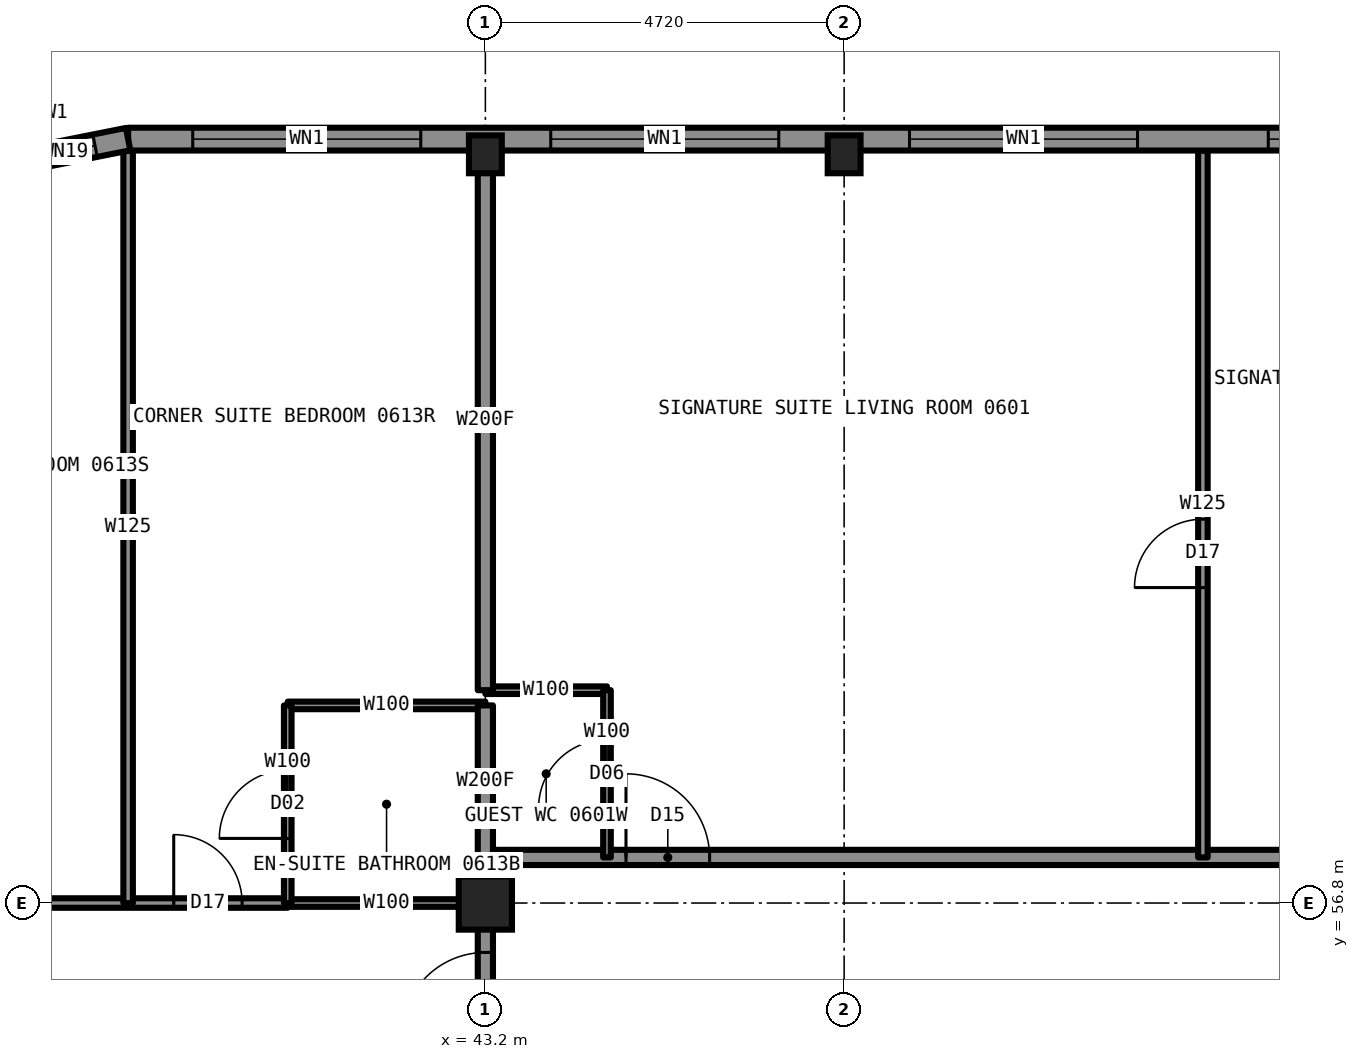
"""IFC4 building model, lengths in metres.
Left out: names, types, materials, properties, quantities, classifications, styles, units other than length and angle.
Written with IfcOpenShell. Run it as: python <this file> out.ifc"""

import sys

from ifc_helpers import new_model, si_unit, direction, frame, frame_2d, origin, origin_2d, place, context, subcontext, project, spatial, rectangle, hollow_rectangle, i_section, extrude, element, fill, save


model = new_model("IFC4")
c1 = context("Model", 3, precision=1e-05, world=origin(), true_north=direction((0.0, 1.0)))
c2 = subcontext(c1, "Body", "Model", "MODEL_VIEW")
j1 = project(units=[si_unit("LENGTHUNIT", "METRE"), si_unit("PLANEANGLEUNIT", "RADIAN")], contexts=[c1])
p1 = place(None, origin())
s1 = spatial("IfcSite", under=j1, at=p1, CompositionType="ELEMENT")
p2 = place(p1, origin())
s2 = spatial("IfcBuilding", under=s1, at=p2, CompositionType="ELEMENT")
p3 = place(p2, frame((0.0, 0.0, 28.5)))
s3 = spatial("IfcBuildingStorey", under=s2, at=p3, CompositionType="ELEMENT", Elevation=28.5)
for number, where, z_axis, x_axis in (
    (1, (43.2, 66.65, 0.0), (0.0, 0.0, 1.0), (1.0, 0.0, 0.0)),
    (2, (47.92, 66.65, 0.0), (0.0, 0.0, 1.0), (1.0, 0.0, 0.0)),
):
    element("IfcColumn", number, at=place(p3, frame(where, z_axis=z_axis, x_axis=x_axis)), inside=s3, PredefinedType="COLUMN", context=c2, shape_type="SweptSolid", body=[
        extrude(i_section(OverallWidth=0.432, OverallDepth=0.498, WebThickness=0.056, FlangeThickness=0.089, at=origin_2d()), origin(), (0.0, 0.0, 1.0), 3.5),
    ])
p4 = place(p3, frame((43.2, 56.8, 0.0), z_axis=(0.0, 0.0, 1.0), x_axis=(1.0, 0.0, 0.0)))
e3 = element("IfcColumn", 3, at=p4, inside=s3, PredefinedType="COLUMN", context=c2, shape_type="SweptSolid", body=[
    extrude(hollow_rectangle(XDim=0.7, YDim=0.7, WallThickness=0.06, at=origin_2d()), origin(), (0.0, 0.0, 1.0), 3.5),
])
p5 = place(p3, frame((40.6, 56.8, 0.0), z_axis=(0.0, 0.0, 1.0), x_axis=(1.0, 0.0, 0.0)))
e4 = element("IfcWall", 4, at=p5, inside=s3, PredefinedType="PARTITIONING", context=c2, shape_type="SweptSolid", body=[
    extrude(rectangle(XDim=2.6, YDim=0.1, at=frame_2d((1.3, 0.0))), origin(), (0.0, 0.0, 1.0), 2.573),
])
p6 = place(p3, frame((33.3, 56.8, 0.0), z_axis=(0.0, 0.0, 1.0), x_axis=(1.0, 0.0, 0.0)))
e5 = element("IfcWall", 5, at=p6, inside=s3, PredefinedType="PARTITIONING", context=c2, shape_type="SweptSolid", body=[
    extrude(rectangle(XDim=7.3, YDim=0.125, at=frame_2d((3.65, 0.0))), origin(), (0.0, 0.0, 1.0), 2.573),
])
p7 = place(p6, frame((5.8, 0.0, 0.0)))
e6 = element("IfcOpeningElement", 6, at=p7, cuts=e5, PredefinedType="OPENING", context=c2, shape_type="SweptSolid", body=[
    extrude(rectangle(XDim=0.9, YDim=2.2, at=frame_2d((0.45, 1.1))), frame((0.0, 0.073, 0.0), z_axis=(0.0, -1.0, 0.0), x_axis=(1.0, 0.0, 0.0)), (0.0, 0.0, 1.0), 0.145),
])
p8 = place(p6, frame((2.0, 0.0, 0.0)))
e7 = element("IfcOpeningElement", 7, at=p8, cuts=e5, PredefinedType="OPENING", context=c2, shape_type="SweptSolid", body=[
    extrude(rectangle(XDim=0.9, YDim=2.2, at=frame_2d((0.45, 1.1))), frame((0.0, 0.073, 0.0), z_axis=(0.0, -1.0, 0.0), x_axis=(1.0, 0.0, 0.0)), (0.0, 0.0, 1.0), 0.145),
])
p9 = place(p3, frame((43.2, 57.4, 0.0), z_axis=(0.0, 0.0, 1.0), x_axis=(1.0, 0.0, 0.0)))
e8 = element("IfcWall", 8, at=p9, inside=s3, PredefinedType="PARTITIONING", context=c2, shape_type="SweptSolid", body=[
    extrude(rectangle(XDim=23.6, YDim=0.2, at=frame_2d((11.8, 0.0))), origin(), (0.0, 0.0, 1.0), 3.33),
])
p10 = place(p9, frame((1.85, 0.0, 0.0)))
e9 = element("IfcOpeningElement", 9, at=p10, cuts=e8, PredefinedType="OPENING", context=c2, shape_type="SweptSolid", body=[
    extrude(rectangle(XDim=1.1, YDim=2.2, at=frame_2d((0.55, 1.1))), frame((0.0, 0.11, 0.0), z_axis=(0.0, -1.0, 0.0), x_axis=(1.0, 0.0, 0.0)), (0.0, 0.0, 1.0), 0.22),
])
p11 = place(p9, frame((15.62, 0.0, 0.0)))
e10 = element("IfcOpeningElement", 10, at=p11, cuts=e8, PredefinedType="OPENING", context=c2, shape_type="SweptSolid", body=[
    extrude(rectangle(XDim=1.0, YDim=2.2, at=frame_2d((0.5, 1.1))), frame((0.0, 0.11, 0.0), z_axis=(0.0, -1.0, 0.0), x_axis=(1.0, 0.0, 0.0)), (0.0, 0.0, 1.0), 0.22),
])
p12 = place(p9, frame((20.34, 0.0, 0.0)))
e11 = element("IfcOpeningElement", 11, at=p12, cuts=e8, PredefinedType="OPENING", context=c2, shape_type="SweptSolid", body=[
    extrude(rectangle(XDim=1.0, YDim=2.2, at=frame_2d((0.5, 1.1))), frame((0.0, 0.11, 0.0), z_axis=(0.0, -1.0, 0.0), x_axis=(1.0, 0.0, 0.0)), (0.0, 0.0, 1.0), 0.22),
])
p13 = place(p3, frame((40.6, 59.4, 0.0), z_axis=(0.0, 0.0, 1.0), x_axis=(1.0, 0.0, 0.0)))
e12 = element("IfcWall", 12, at=p13, inside=s3, PredefinedType="PARTITIONING", context=c2, shape_type="SweptSolid", body=[
    extrude(rectangle(XDim=2.6, YDim=0.1, at=frame_2d((1.3, 0.0))), origin(), (0.0, 0.0, 1.0), 3.33),
])
p14 = place(p3, frame((43.2, 59.6, 0.0), z_axis=(0.0, 0.0, 1.0), x_axis=(1.0, 0.0, 0.0)))
e13 = element("IfcWall", 13, at=p14, inside=s3, PredefinedType="PARTITIONING", context=c2, shape_type="SweptSolid", body=[
    extrude(rectangle(XDim=1.6, YDim=0.1, at=frame_2d((0.8, 0.0))), origin(), (0.0, 0.0, 1.0), 3.33),
])
p15 = place(p3, frame((44.8, 57.4, 0.0), z_axis=(0.0, 0.0, 1.0), x_axis=(0.0, 1.0, 0.0)))
e14 = element("IfcWall", 14, at=p15, inside=s3, PredefinedType="PARTITIONING", context=c2, shape_type="SweptSolid", body=[
    extrude(rectangle(XDim=2.2, YDim=0.1, at=frame_2d((1.1, 0.0))), origin(), (0.0, 0.0, 1.0), 3.33),
])
p16 = place(p15, frame((0.65, 0.0, 0.0)))
e15 = element("IfcOpeningElement", 15, at=p16, cuts=e14, PredefinedType="OPENING", context=c2, shape_type="SweptSolid", body=[
    extrude(rectangle(XDim=0.9, YDim=2.1, at=frame_2d((0.45, 1.05))), frame((0.0, 0.06, 0.0), z_axis=(0.0, -1.0, 0.0), x_axis=(1.0, 0.0, 0.0)), (0.0, 0.0, 1.0), 0.12),
])
p17 = place(p3, frame((43.2, 33.22, 0.0), z_axis=(0.0, 0.0, 1.0), x_axis=(0.0, 1.0, 0.0)))
e16 = element("IfcWall", 16, at=p17, inside=s3, PredefinedType="PARTITIONING", context=c2, shape_type="SweptSolid", body=[
    extrude(rectangle(XDim=23.56, YDim=0.2, at=frame_2d((11.78, 0.0))), origin(), (0.0, 0.0, 1.0), 3.33),
])
p18 = place(p17, frame((6.16, 0.0, 0.0)))
e17 = element("IfcOpeningElement", 17, at=p18, cuts=e16, PredefinedType="OPENING", context=c2, shape_type="SweptSolid", body=[
    extrude(rectangle(XDim=1.0, YDim=2.2, at=frame_2d((0.5, 1.1))), frame((0.0, 0.11, 0.0), z_axis=(0.0, -1.0, 0.0), x_axis=(1.0, 0.0, 0.0)), (0.0, 0.0, 1.0), 0.22),
])
p19 = place(p17, frame((11.68, 0.0, 0.0)))
e18 = element("IfcOpeningElement", 18, at=p19, cuts=e16, PredefinedType="OPENING", context=c2, shape_type="SweptSolid", body=[
    extrude(rectangle(XDim=1.0, YDim=2.2, at=frame_2d((0.5, 1.1))), frame((0.0, 0.11, 0.0), z_axis=(0.0, -1.0, 0.0), x_axis=(1.0, 0.0, 0.0)), (0.0, 0.0, 1.0), 0.22),
])
p20 = place(p17, frame((14.54, 0.0, 0.0)))
e19 = element("IfcOpeningElement", 19, at=p20, cuts=e16, PredefinedType="OPENING", context=c2, shape_type="SweptSolid", body=[
    extrude(rectangle(XDim=1.0, YDim=2.2, at=frame_2d((0.5, 1.1))), frame((0.0, 0.11, 0.0), z_axis=(0.0, -1.0, 0.0), x_axis=(1.0, 0.0, 0.0)), (0.0, 0.0, 1.0), 0.22),
])
p21 = place(p17, frame((21.83, 0.0, 0.0)))
e20 = element("IfcOpeningElement", 20, at=p21, cuts=e16, PredefinedType="OPENING", context=c2, shape_type="SweptSolid", body=[
    extrude(rectangle(XDim=1.1, YDim=2.2, at=frame_2d((0.55, 1.1))), frame((0.0, 0.11, 0.0), z_axis=(0.0, -1.0, 0.0), x_axis=(1.0, 0.0, 0.0)), (0.0, 0.0, 1.0), 0.22),
])
p22 = place(p17, frame((0.63, 0.0, 0.0)))
e21 = element("IfcOpeningElement", 21, at=p22, cuts=e16, PredefinedType="OPENING", context=c2, shape_type="SweptSolid", body=[
    extrude(rectangle(XDim=1.1, YDim=2.2, at=frame_2d((0.55, 1.1))), frame((0.0, 0.11, 0.0), z_axis=(0.0, -1.0, 0.0), x_axis=(1.0, 0.0, 0.0)), (0.0, 0.0, 1.0), 0.22),
])
p23 = place(p3, frame((43.2, 57.4, 0.0), z_axis=(0.0, 0.0, 1.0), x_axis=(0.0, 1.0, 0.0)))
e22 = element("IfcWall", 22, at=p23, inside=s3, PredefinedType="PARTITIONING", context=c2, shape_type="SweptSolid", body=[
    extrude(rectangle(XDim=2.0, YDim=0.2, at=frame_2d((1.0, 0.0))), origin(), (0.0, 0.0, 1.0), 2.573),
])
p24 = place(p3, frame((43.2, 59.6, 0.0), z_axis=(0.0, 0.0, 1.0), x_axis=(0.0, 1.0, 0.0)))
e23 = element("IfcWall", 23, at=p24, inside=s3, PredefinedType="PARTITIONING", context=c2, shape_type="SweptSolid", body=[
    extrude(rectangle(XDim=7.1, YDim=0.2, at=frame_2d((3.55, 0.0))), origin(), (0.0, 0.0, 1.0), 2.573),
])
p25 = place(p3, frame((40.6, 56.8, 0.0), z_axis=(0.0, 0.0, 1.0), x_axis=(0.0, 1.0, 0.0)))
e24 = element("IfcWall", 24, at=p25, inside=s3, PredefinedType="PARTITIONING", context=c2, shape_type="SweptSolid", body=[
    extrude(rectangle(XDim=2.6, YDim=0.1, at=frame_2d((1.3, 0.0))), origin(), (0.0, 0.0, 1.0), 3.33),
])
p26 = place(p25, frame((0.85, 0.0, 0.0)))
e25 = element("IfcOpeningElement", 25, at=p26, cuts=e24, PredefinedType="OPENING", context=c2, shape_type="SweptSolid", body=[
    extrude(rectangle(XDim=0.9, YDim=2.1, at=frame_2d((0.45, 1.05))), frame((0.0, 0.06, 0.0), z_axis=(0.0, -1.0, 0.0), x_axis=(1.0, 0.0, 0.0)), (0.0, 0.0, 1.0), 0.12),
])
p27 = place(p3, frame((38.5, 56.8, 0.0), z_axis=(0.0, 0.0, 1.0), x_axis=(0.0, 1.0, 0.0)))
e26 = element("IfcWall", 26, at=p27, inside=s3, PredefinedType="PARTITIONING", context=c2, shape_type="SweptSolid", body=[
    extrude(rectangle(XDim=9.894, YDim=0.125, at=frame_2d((4.947, 0.0))), origin(), (0.0, 0.0, 1.0), 3.33),
])
p28 = place(p3, frame((52.64, 57.4, 0.0), z_axis=(0.0, 0.0, 1.0), x_axis=(0.0, 1.0, 0.0)))
e27 = element("IfcWall", 27, at=p28, inside=s3, PredefinedType="PARTITIONING", context=c2, shape_type="SweptSolid", body=[
    extrude(rectangle(XDim=9.3, YDim=0.125, at=frame_2d((4.65, 0.0))), origin(), (0.0, 0.0, 1.0), 3.33),
])
p29 = place(p28, frame((3.55, 0.0, 0.0)))
e28 = element("IfcOpeningElement", 28, at=p29, cuts=e27, PredefinedType="OPENING", context=c2, shape_type="SweptSolid", body=[
    extrude(rectangle(XDim=0.9, YDim=2.2, at=frame_2d((0.45, 1.1))), frame((0.0, 0.073, 0.0), z_axis=(0.0, -1.0, 0.0), x_axis=(1.0, 0.0, 0.0)), (0.0, 0.0, 1.0), 0.145),
])
p30 = place(p3, frame((71.5, 66.85, 0.0), z_axis=(0.0, 0.0, 1.0), x_axis=(-1.0, 0.0, 0.0)))
e29 = element("IfcWall", 29, at=p30, inside=s3, PredefinedType="SOLIDWALL", context=c2, shape_type="SweptSolid", body=[
    extrude(rectangle(XDim=33.0, YDim=0.3, at=frame_2d((16.5, 0.0))), origin(), (0.0, 0.0, 1.0), 2.83),
])
p31 = place(p30, frame((0.85, 0.0, 0.5)))
e30 = element("IfcOpeningElement", 30, at=p31, cuts=e29, PredefinedType="OPENING", context=c2, shape_type="SweptSolid", body=[
    extrude(rectangle(XDim=3.0, YDim=2.0, at=frame_2d((1.5, 1.0))), frame((0.0, 0.16, 0.0), z_axis=(0.0, -1.0, 0.0), x_axis=(1.0, 0.0, 0.0)), (0.0, 0.0, 1.0), 0.32),
])
p32 = place(p30, frame((5.56, 0.0, 0.5)))
e31 = element("IfcOpeningElement", 31, at=p32, cuts=e29, PredefinedType="OPENING", context=c2, shape_type="SweptSolid", body=[
    extrude(rectangle(XDim=3.0, YDim=2.0, at=frame_2d((1.5, 1.0))), frame((0.0, 0.16, 0.0), z_axis=(0.0, -1.0, 0.0), x_axis=(1.0, 0.0, 0.0)), (0.0, 0.0, 1.0), 0.32),
])
p33 = place(p30, frame((10.28, 0.0, 0.5)))
e32 = element("IfcOpeningElement", 32, at=p33, cuts=e29, PredefinedType="OPENING", context=c2, shape_type="SweptSolid", body=[
    extrude(rectangle(XDim=3.0, YDim=2.0, at=frame_2d((1.5, 1.0))), frame((0.0, 0.16, 0.0), z_axis=(0.0, -1.0, 0.0), x_axis=(1.0, 0.0, 0.0)), (0.0, 0.0, 1.0), 0.32),
])
p34 = place(p30, frame((15.0, 0.0, 0.5)))
e33 = element("IfcOpeningElement", 33, at=p34, cuts=e29, PredefinedType="OPENING", context=c2, shape_type="SweptSolid", body=[
    extrude(rectangle(XDim=3.0, YDim=2.0, at=frame_2d((1.5, 1.0))), frame((0.0, 0.16, 0.0), z_axis=(0.0, -1.0, 0.0), x_axis=(1.0, 0.0, 0.0)), (0.0, 0.0, 1.0), 0.32),
])
p35 = place(p30, frame((19.72, 0.0, 0.5)))
e34 = element("IfcOpeningElement", 34, at=p35, cuts=e29, PredefinedType="OPENING", context=c2, shape_type="SweptSolid", body=[
    extrude(rectangle(XDim=3.0, YDim=2.0, at=frame_2d((1.5, 1.0))), frame((0.0, 0.16, 0.0), z_axis=(0.0, -1.0, 0.0), x_axis=(1.0, 0.0, 0.0)), (0.0, 0.0, 1.0), 0.32),
])
p36 = place(p30, frame((24.44, 0.0, 0.5)))
e35 = element("IfcOpeningElement", 35, at=p36, cuts=e29, PredefinedType="OPENING", context=c2, shape_type="SweptSolid", body=[
    extrude(rectangle(XDim=3.0, YDim=2.0, at=frame_2d((1.5, 1.0))), frame((0.0, 0.16, 0.0), z_axis=(0.0, -1.0, 0.0), x_axis=(1.0, 0.0, 0.0)), (0.0, 0.0, 1.0), 0.32),
])
p37 = place(p30, frame((29.15, 0.0, 0.5)))
e36 = element("IfcOpeningElement", 36, at=p37, cuts=e29, PredefinedType="OPENING", context=c2, shape_type="SweptSolid", body=[
    extrude(rectangle(XDim=3.0, YDim=2.0, at=frame_2d((1.5, 1.0))), frame((0.0, 0.16, 0.0), z_axis=(0.0, -1.0, 0.0), x_axis=(1.0, 0.0, 0.0)), (0.0, 0.0, 1.0), 0.32),
])
p38 = place(p3, frame((38.5, 66.85, 0.0), z_axis=(0.0, 0.0, 1.0), x_axis=(-0.980787050784, -0.195081421501, 0.0)))
e37 = element("IfcWall", 37, at=p38, inside=s3, PredefinedType="SOLIDWALL", context=c2, shape_type="SweptSolid", body=[
    extrude(rectangle(XDim=2.087, YDim=0.3, at=frame_2d((1.044, 0.0))), origin(), (0.0, 0.0, 1.0), 3.33),
])
p39 = place(p38, frame((0.444, 0.0, 0.5)))
e38 = element("IfcOpeningElement", 38, at=p39, cuts=e37, PredefinedType="OPENING", context=c2, shape_type="SweptSolid", body=[
    extrude(rectangle(XDim=0.8, YDim=1.1, at=frame_2d((0.4, 0.55))), frame((0.0, 0.16, 0.0), z_axis=(0.0, -1.0, 0.0), x_axis=(1.0, 0.0, 0.0)), (0.0, 0.0, 1.0), 0.32),
])
p40 = place(p3, frame((43.2, 56.78, 0.0), z_axis=(0.0, 0.0, 1.0), x_axis=(0.0, 1.0, 0.0)))
e39 = element("IfcWall", 39, at=p40, inside=s3, PredefinedType="PARTITIONING", context=c2, shape_type="SweptSolid", body=[
    extrude(rectangle(XDim=0.62, YDim=0.2, at=frame_2d((0.31, 0.0))), origin(), (0.0, 0.0, 1.0), 2.573),
])
p41 = place(p10, origin())
e40 = element("IfcDoor", 40, at=p41, inside=s3, OperationType="SINGLE_SWING_LEFT", PredefinedType="DOOR", context=c2, shape_type="SweptSolid", body=[
    extrude(rectangle(XDim=1.1, YDim=2.2, at=frame_2d((0.55, 1.1))), frame((0.0, 0.025, 0.0), z_axis=(0.0, -1.0, 0.0), x_axis=(1.0, 0.0, 0.0)), (0.0, 0.0, 1.0), 0.05),
])
fill(e9, e40)
p42 = place(p29, origin())
e41 = element("IfcDoor", 41, at=p42, inside=s3, OperationType="SINGLE_SWING_LEFT", PredefinedType="DOOR", context=c2, shape_type="SweptSolid", body=[
    extrude(rectangle(XDim=0.9, YDim=2.2, at=frame_2d((0.45, 1.1))), frame((0.0, 0.025, 0.0), z_axis=(0.0, -1.0, 0.0), x_axis=(1.0, 0.0, 0.0)), (0.0, 0.0, 1.0), 0.05),
])
fill(e28, e41)
p43 = place(p16, origin())
e42 = element("IfcDoor", 42, at=p43, inside=s3, OperationType="SINGLE_SWING_LEFT", PredefinedType="DOOR", context=c2, shape_type="SweptSolid", body=[
    extrude(rectangle(XDim=0.9, YDim=2.1, at=frame_2d((0.45, 1.05))), frame((0.0, 0.025, 0.0), z_axis=(0.0, -1.0, 0.0), x_axis=(1.0, 0.0, 0.0)), (0.0, 0.0, 1.0), 0.05),
])
fill(e15, e42)
p44 = place(p21, origin())
e43 = element("IfcDoor", 43, at=p44, inside=s3, OperationType="SINGLE_SWING_LEFT", PredefinedType="DOOR", context=c2, shape_type="SweptSolid", body=[
    extrude(rectangle(XDim=1.1, YDim=2.2, at=frame_2d((0.55, 1.1))), frame((0.0, 0.025, 0.0), z_axis=(0.0, -1.0, 0.0), x_axis=(1.0, 0.0, 0.0)), (0.0, 0.0, 1.0), 0.05),
])
fill(e20, e43)
p45 = place(p26, origin())
e44 = element("IfcDoor", 44, at=p45, inside=s3, OperationType="SINGLE_SWING_RIGHT", PredefinedType="DOOR", context=c2, shape_type="SweptSolid", body=[
    extrude(rectangle(XDim=0.9, YDim=2.1, at=frame_2d((0.45, 1.05))), frame((0.0, 0.025, 0.0), z_axis=(0.0, -1.0, 0.0), x_axis=(1.0, 0.0, 0.0)), (0.0, 0.0, 1.0), 0.05),
])
fill(e25, e44)
p46 = place(p7, origin())
e45 = element("IfcDoor", 45, at=p46, inside=s3, OperationType="SINGLE_SWING_LEFT", PredefinedType="DOOR", context=c2, shape_type="SweptSolid", body=[
    extrude(rectangle(XDim=0.9, YDim=2.2, at=frame_2d((0.45, 1.1))), frame((0.0, 0.025, 0.0), z_axis=(0.0, -1.0, 0.0), x_axis=(1.0, 0.0, 0.0)), (0.0, 0.0, 1.0), 0.05),
])
fill(e6, e45)
p47 = place(p34, origin())
e46 = element("IfcWindow", 46, at=p47, inside=s3, PartitioningType="SINGLE_PANEL", PredefinedType="WINDOW", context=c2, shape_type="SweptSolid", body=[
    extrude(rectangle(XDim=3.0, YDim=2.0, at=frame_2d((1.5, 1.0))), frame((0.0, 0.03, 0.0), z_axis=(0.0, -1.0, 0.0), x_axis=(1.0, 0.0, 0.0)), (0.0, 0.0, 1.0), 0.06),
])
fill(e33, e46)
p48 = place(p35, origin())
e47 = element("IfcWindow", 47, at=p48, inside=s3, PartitioningType="SINGLE_PANEL", PredefinedType="WINDOW", context=c2, shape_type="SweptSolid", body=[
    extrude(rectangle(XDim=3.0, YDim=2.0, at=frame_2d((1.5, 1.0))), frame((0.0, 0.03, 0.0), z_axis=(0.0, -1.0, 0.0), x_axis=(1.0, 0.0, 0.0)), (0.0, 0.0, 1.0), 0.06),
])
fill(e34, e47)
p49 = place(p36, origin())
e48 = element("IfcWindow", 48, at=p49, inside=s3, PartitioningType="SINGLE_PANEL", PredefinedType="WINDOW", context=c2, shape_type="SweptSolid", body=[
    extrude(rectangle(XDim=3.0, YDim=2.0, at=frame_2d((1.5, 1.0))), frame((0.0, 0.03, 0.0), z_axis=(0.0, -1.0, 0.0), x_axis=(1.0, 0.0, 0.0)), (0.0, 0.0, 1.0), 0.06),
])
fill(e35, e48)
p50 = place(p37, origin())
e49 = element("IfcWindow", 49, at=p50, inside=s3, PartitioningType="SINGLE_PANEL", PredefinedType="WINDOW", context=c2, shape_type="SweptSolid", body=[
    extrude(rectangle(XDim=3.0, YDim=2.0, at=frame_2d((1.5, 1.0))), frame((0.0, 0.03, 0.0), z_axis=(0.0, -1.0, 0.0), x_axis=(1.0, 0.0, 0.0)), (0.0, 0.0, 1.0), 0.06),
])
fill(e36, e49)
p51 = place(p39, origin())
e50 = element("IfcWindow", 50, at=p51, inside=s3, PartitioningType="SINGLE_PANEL", PredefinedType="WINDOW", context=c2, shape_type="SweptSolid", body=[
    extrude(rectangle(XDim=0.8, YDim=1.1, at=frame_2d((0.4, 0.55))), frame((0.0, 0.03, 0.0), z_axis=(0.0, -1.0, 0.0), x_axis=(1.0, 0.0, 0.0)), (0.0, 0.0, 1.0), 0.06),
])
fill(e38, e50)
save(model, sys.argv[1])
